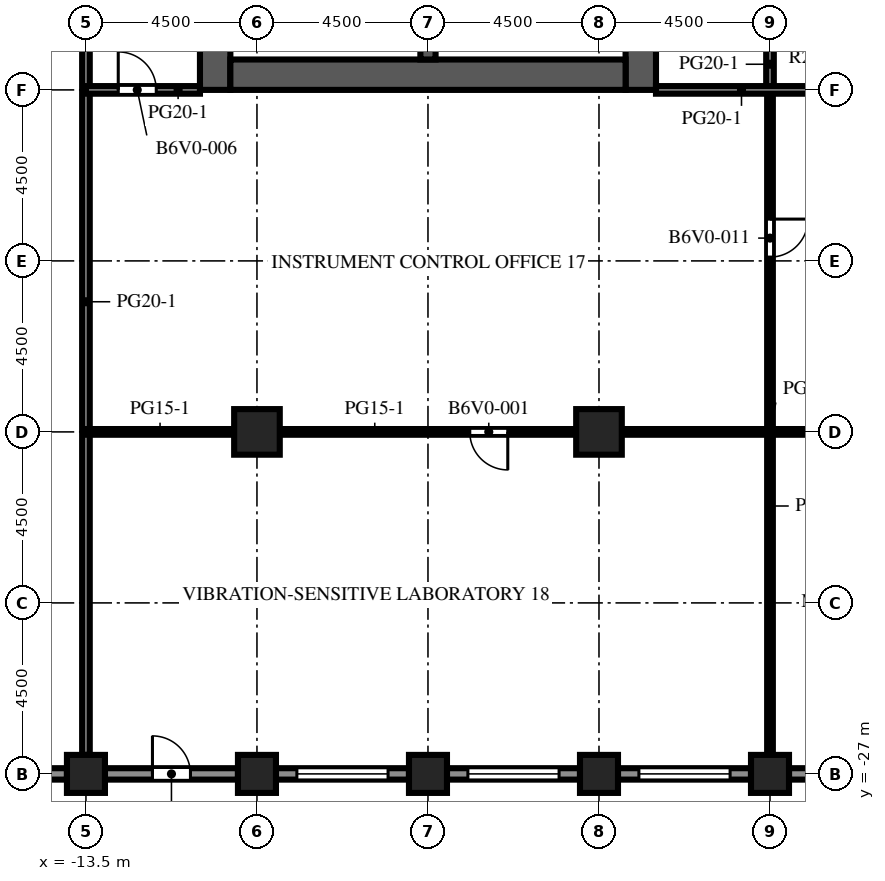
"""IFC4 building model, lengths in metres.
Left out: names, types, materials, properties, quantities, classifications, styles, units other than length and angle.
Written with IfcOpenShell. Run it as: python <this file> out.ifc"""

import sys

from ifc_helpers import new_model, si_unit, direction, frame, frame_2d, origin, origin_2d, place, context, subcontext, project, spatial, rectangle, extrude, element, fill, save


model = new_model("IFC4")
c1 = context("Model", 3, precision=1e-05, world=origin(), true_north=direction((0.0, 1.0)))
c2 = subcontext(c1, "Body", "Model", "MODEL_VIEW")
j1 = project(units=[si_unit("LENGTHUNIT", "METRE"), si_unit("PLANEANGLEUNIT", "RADIAN")], contexts=[c1])
p1 = place(None, origin())
s1 = spatial("IfcSite", under=j1, at=p1, CompositionType="ELEMENT")
p2 = place(p1, origin())
s2 = spatial("IfcBuilding", under=s1, at=p2, CompositionType="ELEMENT")
p3 = place(p2, frame((0.0, 0.0, 195.6)))
s3 = spatial("IfcBuildingStorey", under=s2, at=p3, CompositionType="ELEMENT", Elevation=195.6)
for number, where, z_axis, x_axis in (
    (1, (-13.5, -27.0, 0.0), (0.0, 0.0, 1.0), (1.0, 0.0, 0.0)),
    (2, (-9.0, -27.0, 0.0), (0.0, 0.0, 1.0), (1.0, 0.0, 0.0)),
    (3, (-4.5, -27.0, 0.0), (0.0, 0.0, 1.0), (1.0, 0.0, 0.0)),
    (4, (0.0, -27.0, 0.0), (0.0, 0.0, 1.0), (1.0, 0.0, 0.0)),
    (5, (4.5, -27.0, 0.0), (0.0, 0.0, 1.0), (1.0, 0.0, 0.0)),
):
    element("IfcColumn", number, at=place(p3, frame(where, z_axis=z_axis, x_axis=x_axis)), inside=s3, PredefinedType="COLUMN", context=c2, shape_type="SweptSolid", body=[
        extrude(rectangle(XDim=1.0, YDim=1.0, at=origin_2d()), origin(), (0.0, 0.0, 1.0), 4.1),
    ])
for number, where, z_axis, x_axis in (
    (6, (-9.0, -18.0, 0.0), (0.0, 0.0, 1.0), (1.0, 0.0, 0.0)),
    (7, (0.0, -18.0, 0.0), (0.0, 0.0, 1.0), (1.0, 0.0, 0.0)),
):
    element("IfcColumn", number, at=place(p3, frame(where, z_axis=z_axis, x_axis=x_axis)), inside=s3, PredefinedType="COLUMN", context=c2, shape_type="SweptSolid", body=[
        extrude(rectangle(XDim=1.2, YDim=1.2, at=origin_2d()), origin(), (0.0, 0.0, 1.0), 4.1),
    ])
p4 = place(p3, frame((-10.1, -9.0, 0.0), z_axis=(0.0, 0.0, 1.0), x_axis=(0.0, 1.0, 0.0)))
e8 = element("IfcWall", 8, at=p4, inside=s3, PredefinedType="SHEAR", context=c2, shape_type="SweptSolid", body=[
    extrude(rectangle(XDim=27.5, YDim=0.8, at=frame_2d((13.75, 0.0))), origin(), (0.0, 0.0, 1.0), 4.1),
])
p5 = place(p4, frame((12.55, 0.0, 0.0)))
e9 = element("IfcOpeningElement", 9, at=p5, cuts=e8, PredefinedType="OPENING", context=c2, shape_type="SweptSolid", body=[
    extrude(rectangle(XDim=2.4, YDim=2.4, at=frame_2d((1.2, 1.2))), frame((0.0, 0.41, 0.0), z_axis=(0.0, -1.0, 0.0), x_axis=(1.0, 0.0, 0.0)), (0.0, 0.0, 1.0), 0.82),
])
p6 = place(p4, frame((6.825, 0.0, 0.0)))
e10 = element("IfcOpeningElement", 10, at=p6, cuts=e8, PredefinedType="OPENING", context=c2, shape_type="SweptSolid", body=[
    extrude(rectangle(XDim=1.2, YDim=2.1, at=frame_2d((0.6, 1.05))), frame((0.0, 0.41, 0.0), z_axis=(0.0, -1.0, 0.0), x_axis=(1.0, 0.0, 0.0)), (0.0, 0.0, 1.0), 0.82),
])
p7 = place(p4, frame((19.475, 0.0, 0.0)))
e11 = element("IfcOpeningElement", 11, at=p7, cuts=e8, PredefinedType="OPENING", context=c2, shape_type="SweptSolid", body=[
    extrude(rectangle(XDim=1.2, YDim=2.1, at=frame_2d((0.6, 1.05))), frame((0.0, 0.41, 0.0), z_axis=(0.0, -1.0, 0.0), x_axis=(1.0, 0.0, 0.0)), (0.0, 0.0, 1.0), 0.82),
])
p8 = place(p3, frame((1.1, -9.0, 0.0), z_axis=(0.0, 0.0, 1.0), x_axis=(0.0, 1.0, 0.0)))
e12 = element("IfcWall", 12, at=p8, inside=s3, PredefinedType="SHEAR", context=c2, shape_type="SweptSolid", body=[
    extrude(rectangle(XDim=27.5, YDim=0.8, at=frame_2d((13.75, 0.0))), origin(), (0.0, 0.0, 1.0), 4.1),
])
p9 = place(p8, frame((12.55, 0.0, 0.0)))
e13 = element("IfcOpeningElement", 13, at=p9, cuts=e12, PredefinedType="OPENING", context=c2, shape_type="SweptSolid", body=[
    extrude(rectangle(XDim=2.4, YDim=2.4, at=frame_2d((1.2, 1.2))), frame((0.0, 0.41, 0.0), z_axis=(0.0, -1.0, 0.0), x_axis=(1.0, 0.0, 0.0)), (0.0, 0.0, 1.0), 0.82),
])
p10 = place(p8, frame((3.95, 0.0, 0.0)))
e14 = element("IfcOpeningElement", 14, at=p10, cuts=e12, PredefinedType="OPENING", context=c2, shape_type="SweptSolid", body=[
    extrude(rectangle(XDim=1.2, YDim=2.1, at=frame_2d((0.6, 1.05))), frame((0.0, 0.41, 0.0), z_axis=(0.0, -1.0, 0.0), x_axis=(1.0, 0.0, 0.0)), (0.0, 0.0, 1.0), 0.82),
])
p11 = place(p8, frame((19.45, 0.0, 0.0)))
e15 = element("IfcOpeningElement", 15, at=p11, cuts=e12, PredefinedType="OPENING", context=c2, shape_type="SweptSolid", body=[
    extrude(rectangle(XDim=1.0, YDim=2.1, at=frame_2d((0.5, 1.05))), frame((0.0, 0.41, 0.0), z_axis=(0.0, -1.0, 0.0), x_axis=(1.0, 0.0, 0.0)), (0.0, 0.0, 1.0), 0.82),
])
p12 = place(p8, frame((21.137, 0.0, 0.0)))
e16 = element("IfcOpeningElement", 16, at=p12, cuts=e12, PredefinedType="OPENING", context=c2, shape_type="SweptSolid", body=[
    extrude(rectangle(XDim=1.0, YDim=2.1, at=frame_2d((0.5, 1.05))), frame((0.0, 0.41, 0.0), z_axis=(0.0, -1.0, 0.0), x_axis=(1.0, 0.0, 0.0)), (0.0, 0.0, 1.0), 0.82),
])
p13 = place(p8, frame((23.2, 0.0, 0.0)))
e17 = element("IfcOpeningElement", 17, at=p13, cuts=e12, PredefinedType="OPENING", context=c2, shape_type="SweptSolid", body=[
    extrude(rectangle(XDim=1.0, YDim=2.1, at=frame_2d((0.5, 1.05))), frame((0.0, 0.41, 0.0), z_axis=(0.0, -1.0, 0.0), x_axis=(1.0, 0.0, 0.0)), (0.0, 0.0, 1.0), 0.82),
])
p14 = place(p8, frame((25.262, 0.0, 0.0)))
e18 = element("IfcOpeningElement", 18, at=p14, cuts=e12, PredefinedType="OPENING", context=c2, shape_type="SweptSolid", body=[
    extrude(rectangle(XDim=1.0, YDim=2.1, at=frame_2d((0.5, 1.05))), frame((0.0, 0.41, 0.0), z_axis=(0.0, -1.0, 0.0), x_axis=(1.0, 0.0, 0.0)), (0.0, 0.0, 1.0), 0.82),
])
p15 = place(p3, frame((-9.7, -8.6, 0.0), z_axis=(0.0, 0.0, 1.0), x_axis=(1.0, 0.0, 0.0)))
e19 = element("IfcWall", 19, at=p15, inside=s3, PredefinedType="SHEAR", context=c2, shape_type="SweptSolid", body=[
    extrude(rectangle(XDim=10.4, YDim=0.8, at=frame_2d((5.2, 0.0))), origin(), (0.0, 0.0, 1.0), 4.1),
])
p16 = place(p3, frame((-4.5, -8.2, 0.0), z_axis=(0.0, 0.0, 1.0), x_axis=(0.0, 1.0, 0.0)))
e20 = element("IfcWall", 20, at=p16, inside=s3, PredefinedType="SHEAR", context=c2, shape_type="SweptSolid", body=[
    extrude(rectangle(XDim=7.5, YDim=0.4, at=frame_2d((3.75, 0.0))), origin(), (0.0, 0.0, 1.0), 4.1),
])
p17 = place(p3, frame((-14.0, -27.0, 0.0), z_axis=(0.0, 0.0, 1.0), x_axis=(-1.0, 0.0, 0.0)))
e21 = element("IfcWall", 21, at=p17, inside=s3, PredefinedType="SOLIDWALL", context=c2, shape_type="SweptSolid", body=[
    extrude(rectangle(XDim=3.5, YDim=0.3, at=frame_2d((1.75, 0.0))), origin(), (0.0, 0.0, 1.0), 2.85),
])
p18 = place(p17, frame((0.55, 0.0, 0.8)))
e22 = element("IfcOpeningElement", 22, at=p18, cuts=e21, PredefinedType="OPENING", context=c2, shape_type="SweptSolid", body=[
    extrude(rectangle(XDim=2.4, YDim=1.7, at=frame_2d((1.2, 0.85))), frame((0.0, 0.16, 0.0), z_axis=(0.0, -1.0, 0.0), x_axis=(1.0, 0.0, 0.0)), (0.0, 0.0, 1.0), 0.32),
])
p19 = place(p3, frame((-9.5, -27.0, 0.0), z_axis=(0.0, 0.0, 1.0), x_axis=(-1.0, 0.0, 0.0)))
e23 = element("IfcWall", 23, at=p19, inside=s3, PredefinedType="SOLIDWALL", context=c2, shape_type="SweptSolid", body=[
    extrude(rectangle(XDim=3.5, YDim=0.3, at=frame_2d((1.75, 0.0))), origin(), (0.0, 0.0, 1.0), 2.85),
])
p20 = place(p19, frame((1.25, 0.0, 0.0)))
e24 = element("IfcOpeningElement", 24, at=p20, cuts=e23, PredefinedType="OPENING", context=c2, shape_type="SweptSolid", body=[
    extrude(rectangle(XDim=1.0, YDim=2.2, at=frame_2d((0.5, 1.1))), frame((0.0, 0.16, 0.0), z_axis=(0.0, -1.0, 0.0), x_axis=(1.0, 0.0, 0.0)), (0.0, 0.0, 1.0), 0.32),
])
p21 = place(p3, frame((-5.0, -27.0, 0.0), z_axis=(0.0, 0.0, 1.0), x_axis=(-1.0, 0.0, 0.0)))
e25 = element("IfcWall", 25, at=p21, inside=s3, PredefinedType="SOLIDWALL", context=c2, shape_type="SweptSolid", body=[
    extrude(rectangle(XDim=3.5, YDim=0.3, at=frame_2d((1.75, 0.0))), origin(), (0.0, 0.0, 1.0), 2.85),
])
p22 = place(p21, frame((0.55, 0.0, 0.8)))
e26 = element("IfcOpeningElement", 26, at=p22, cuts=e25, PredefinedType="OPENING", context=c2, shape_type="SweptSolid", body=[
    extrude(rectangle(XDim=2.4, YDim=1.7, at=frame_2d((1.2, 0.85))), frame((0.0, 0.16, 0.0), z_axis=(0.0, -1.0, 0.0), x_axis=(1.0, 0.0, 0.0)), (0.0, 0.0, 1.0), 0.32),
])
p23 = place(p3, frame((-0.5, -27.0, 0.0), z_axis=(0.0, 0.0, 1.0), x_axis=(-1.0, 0.0, 0.0)))
e27 = element("IfcWall", 27, at=p23, inside=s3, PredefinedType="SOLIDWALL", context=c2, shape_type="SweptSolid", body=[
    extrude(rectangle(XDim=3.5, YDim=0.3, at=frame_2d((1.75, 0.0))), origin(), (0.0, 0.0, 1.0), 2.85),
])
p24 = place(p23, frame((0.55, 0.0, 0.8)))
e28 = element("IfcOpeningElement", 28, at=p24, cuts=e27, PredefinedType="OPENING", context=c2, shape_type="SweptSolid", body=[
    extrude(rectangle(XDim=2.4, YDim=1.7, at=frame_2d((1.2, 0.85))), frame((0.0, 0.16, 0.0), z_axis=(0.0, -1.0, 0.0), x_axis=(1.0, 0.0, 0.0)), (0.0, 0.0, 1.0), 0.32),
])
p25 = place(p3, frame((4.0, -27.0, 0.0), z_axis=(0.0, 0.0, 1.0), x_axis=(-1.0, 0.0, 0.0)))
e29 = element("IfcWall", 29, at=p25, inside=s3, PredefinedType="SOLIDWALL", context=c2, shape_type="SweptSolid", body=[
    extrude(rectangle(XDim=3.5, YDim=0.3, at=frame_2d((1.75, 0.0))), origin(), (0.0, 0.0, 1.0), 2.85),
])
p26 = place(p25, frame((0.55, 0.0, 0.8)))
e30 = element("IfcOpeningElement", 30, at=p26, cuts=e29, PredefinedType="OPENING", context=c2, shape_type="SweptSolid", body=[
    extrude(rectangle(XDim=2.4, YDim=1.7, at=frame_2d((1.2, 0.85))), frame((0.0, 0.16, 0.0), z_axis=(0.0, -1.0, 0.0), x_axis=(1.0, 0.0, 0.0)), (0.0, 0.0, 1.0), 0.32),
])
p27 = place(p3, frame((8.5, -27.0, 0.0), z_axis=(0.0, 0.0, 1.0), x_axis=(-1.0, 0.0, 0.0)))
e31 = element("IfcWall", 31, at=p27, inside=s3, PredefinedType="SOLIDWALL", context=c2, shape_type="SweptSolid", body=[
    extrude(rectangle(XDim=3.5, YDim=0.3, at=frame_2d((1.75, 0.0))), origin(), (0.0, 0.0, 1.0), 2.85),
])
p28 = place(p27, frame((0.55, 0.0, 0.8)))
e32 = element("IfcOpeningElement", 32, at=p28, cuts=e31, PredefinedType="OPENING", context=c2, shape_type="SweptSolid", body=[
    extrude(rectangle(XDim=2.4, YDim=1.7, at=frame_2d((1.2, 0.85))), frame((0.0, 0.16, 0.0), z_axis=(0.0, -1.0, 0.0), x_axis=(1.0, 0.0, 0.0)), (0.0, 0.0, 1.0), 0.32),
])
p29 = place(p3, frame((-13.5, -26.5, 0.0), z_axis=(0.0, 0.0, 1.0), x_axis=(0.0, 1.0, 0.0)))
e33 = element("IfcWall", 33, at=p29, inside=s3, PredefinedType="PARTITIONING", context=c2, shape_type="SweptSolid", body=[
    extrude(rectangle(XDim=29.75, YDim=0.2, at=frame_2d((14.875, 0.0))), origin(), (0.0, 0.0, 1.0), 3.65),
])
p30 = place(p29, frame((23.85, 0.0, 0.0)))
e34 = element("IfcOpeningElement", 34, at=p30, cuts=e33, PredefinedType="OPENING", context=c2, shape_type="SweptSolid", body=[
    extrude(rectangle(XDim=1.0, YDim=2.1, at=frame_2d((0.5, 1.05))), frame((0.0, 0.11, 0.0), z_axis=(0.0, -1.0, 0.0), x_axis=(1.0, 0.0, 0.0)), (0.0, 0.0, 1.0), 0.22),
])
p31 = place(p3, frame((4.5, -9.0, 0.0), z_axis=(0.0, 0.0, 1.0), x_axis=(0.0, -1.0, 0.0)))
e35 = element("IfcWall", 35, at=p31, inside=s3, PredefinedType="PARTITIONING", context=c2, shape_type="SweptSolid", body=[
    extrude(rectangle(XDim=17.5, YDim=0.15, at=frame_2d((8.75, 0.0))), origin(), (0.0, 0.0, 1.0), 3.65),
])
p32 = place(p31, frame((3.4, 0.0, 0.0)))
e36 = element("IfcOpeningElement", 36, at=p32, cuts=e35, PredefinedType="OPENING", context=c2, shape_type="SweptSolid", body=[
    extrude(rectangle(XDim=1.0, YDim=2.1, at=frame_2d((0.5, 1.05))), frame((0.0, 0.085, 0.0), z_axis=(0.0, -1.0, 0.0), x_axis=(1.0, 0.0, 0.0)), (0.0, 0.0, 1.0), 0.17),
])
p33 = place(p3, frame((4.5, -6.0, 0.0), z_axis=(0.0, 0.0, 1.0), x_axis=(0.0, -1.0, 0.0)))
e37 = element("IfcWall", 37, at=p33, inside=s3, PredefinedType="PARTITIONING", context=c2, shape_type="SweptSolid", body=[
    extrude(rectangle(XDim=3.0, YDim=0.2, at=frame_2d((1.5, 0.0))), origin(), (0.0, 0.0, 1.0), 3.65),
])
p34 = place(p33, frame((0.65, 0.0, 0.0)))
e38 = element("IfcOpeningElement", 38, at=p34, cuts=e37, PredefinedType="OPENING", context=c2, shape_type="SweptSolid", body=[
    extrude(rectangle(XDim=1.0, YDim=2.1, at=frame_2d((0.5, 1.05))), frame((0.0, 0.11, 0.0), z_axis=(0.0, -1.0, 0.0), x_axis=(1.0, 0.0, 0.0)), (0.0, 0.0, 1.0), 0.22),
])
p35 = place(p3, frame((-13.5, -18.0, 0.0), z_axis=(0.0, 0.0, 1.0), x_axis=(1.0, 0.0, 0.0)))
e39 = element("IfcWall", 39, at=p35, inside=s3, PredefinedType="PARTITIONING", context=c2, shape_type="SweptSolid", body=[
    extrude(rectangle(XDim=3.9, YDim=0.15, at=frame_2d((1.95, 0.0))), origin(), (0.0, 0.0, 1.0), 3.65),
])
p36 = place(p3, frame((-0.6, -18.0, 0.0), z_axis=(0.0, 0.0, 1.0), x_axis=(-1.0, 0.0, 0.0)))
e40 = element("IfcWall", 40, at=p36, inside=s3, PredefinedType="PARTITIONING", context=c2, shape_type="SweptSolid", body=[
    extrude(rectangle(XDim=7.8, YDim=0.15, at=frame_2d((3.9, 0.0))), origin(), (0.0, 0.0, 1.0), 3.65),
])
p37 = place(p36, frame((1.8, 0.0, 0.0)))
e41 = element("IfcOpeningElement", 41, at=p37, cuts=e40, PredefinedType="OPENING", context=c2, shape_type="SweptSolid", body=[
    extrude(rectangle(XDim=1.0, YDim=2.1, at=frame_2d((0.5, 1.05))), frame((0.0, 0.085, 0.0), z_axis=(0.0, -1.0, 0.0), x_axis=(1.0, 0.0, 0.0)), (0.0, 0.0, 1.0), 0.17),
])
p38 = place(p3, frame((0.6, -18.0, 0.0), z_axis=(0.0, 0.0, 1.0), x_axis=(1.0, 0.0, 0.0)))
e42 = element("IfcWall", 42, at=p38, inside=s3, PredefinedType="PARTITIONING", context=c2, shape_type="SweptSolid", body=[
    extrude(rectangle(XDim=7.8, YDim=0.15, at=frame_2d((3.9, 0.0))), origin(), (0.0, 0.0, 1.0), 3.65),
])
p39 = place(p3, frame((-10.5, -9.0, 0.0), z_axis=(0.0, 0.0, 1.0), x_axis=(-1.0, 0.0, 0.0)))
e43 = element("IfcWall", 43, at=p39, inside=s3, PredefinedType="PARTITIONING", context=c2, shape_type="SweptSolid", body=[
    extrude(rectangle(XDim=3.0, YDim=0.2, at=frame_2d((1.5, 0.0))), origin(), (0.0, 0.0, 1.0), 3.65),
])
p40 = place(p39, frame((1.15, 0.0, 0.0)))
e44 = element("IfcOpeningElement", 44, at=p40, cuts=e43, PredefinedType="OPENING", context=c2, shape_type="SweptSolid", body=[
    extrude(rectangle(XDim=1.0, YDim=2.1, at=frame_2d((0.5, 1.05))), frame((0.0, 0.11, 0.0), z_axis=(0.0, -1.0, 0.0), x_axis=(1.0, 0.0, 0.0)), (0.0, 0.0, 1.0), 0.22),
])
p41 = place(p3, frame((1.5, -9.0, 0.0), z_axis=(0.0, 0.0, 1.0), x_axis=(1.0, 0.0, 0.0)))
e45 = element("IfcWall", 45, at=p41, inside=s3, PredefinedType="PARTITIONING", context=c2, shape_type="SweptSolid", body=[
    extrude(rectangle(XDim=4.5, YDim=0.2, at=frame_2d((2.25, 0.0))), origin(), (0.0, 0.0, 1.0), 3.65),
])
p42 = place(p20, origin())
e46 = element("IfcDoor", 46, at=p42, inside=s3, OperationType="SINGLE_SWING_RIGHT", PredefinedType="DOOR", context=c2, shape_type="SweptSolid", body=[
    extrude(rectangle(XDim=1.0, YDim=2.2, at=frame_2d((0.5, 1.1))), frame((0.0, 0.025, 0.0), z_axis=(0.0, -1.0, 0.0), x_axis=(1.0, 0.0, 0.0)), (0.0, 0.0, 1.0), 0.05),
])
fill(e24, e46)
p43 = place(p22, origin())
e47 = element("IfcWindow", 47, at=p43, inside=s3, PartitioningType="SINGLE_PANEL", PredefinedType="WINDOW", context=c2, shape_type="SweptSolid", body=[
    extrude(rectangle(XDim=2.4, YDim=1.7, at=frame_2d((1.2, 0.85))), frame((0.0, 0.03, 0.0), z_axis=(0.0, -1.0, 0.0), x_axis=(1.0, 0.0, 0.0)), (0.0, 0.0, 1.0), 0.06),
])
fill(e26, e47)
p44 = place(p24, origin())
e48 = element("IfcWindow", 48, at=p44, inside=s3, PartitioningType="SINGLE_PANEL", PredefinedType="WINDOW", context=c2, shape_type="SweptSolid", body=[
    extrude(rectangle(XDim=2.4, YDim=1.7, at=frame_2d((1.2, 0.85))), frame((0.0, 0.03, 0.0), z_axis=(0.0, -1.0, 0.0), x_axis=(1.0, 0.0, 0.0)), (0.0, 0.0, 1.0), 0.06),
])
fill(e28, e48)
p45 = place(p26, origin())
e49 = element("IfcWindow", 49, at=p45, inside=s3, PartitioningType="SINGLE_PANEL", PredefinedType="WINDOW", context=c2, shape_type="SweptSolid", body=[
    extrude(rectangle(XDim=2.4, YDim=1.7, at=frame_2d((1.2, 0.85))), frame((0.0, 0.03, 0.0), z_axis=(0.0, -1.0, 0.0), x_axis=(1.0, 0.0, 0.0)), (0.0, 0.0, 1.0), 0.06),
])
fill(e30, e49)
p46 = place(p37, origin())
e50 = element("IfcDoor", 50, at=p46, inside=s3, OperationType="SINGLE_SWING_LEFT", PredefinedType="DOOR", context=c2, shape_type="SweptSolid", body=[
    extrude(rectangle(XDim=1.0, YDim=2.1, at=frame_2d((0.5, 1.05))), frame((0.0, 0.025, 0.0), z_axis=(0.0, -1.0, 0.0), x_axis=(1.0, 0.0, 0.0)), (0.0, 0.0, 1.0), 0.05),
])
fill(e41, e50)
p47 = place(p40, origin())
e51 = element("IfcDoor", 51, at=p47, inside=s3, OperationType="SINGLE_SWING_RIGHT", PredefinedType="DOOR", context=c2, shape_type="SweptSolid", body=[
    extrude(rectangle(XDim=1.0, YDim=2.1, at=frame_2d((0.5, 1.05))), frame((0.0, 0.025, 0.0), z_axis=(0.0, -1.0, 0.0), x_axis=(1.0, 0.0, 0.0)), (0.0, 0.0, 1.0), 0.05),
])
fill(e44, e51)
p48 = place(p32, origin())
e52 = element("IfcDoor", 52, at=p48, inside=s3, OperationType="SINGLE_SWING_LEFT", PredefinedType="DOOR", context=c2, shape_type="SweptSolid", body=[
    extrude(rectangle(XDim=1.0, YDim=2.1, at=frame_2d((0.5, 1.05))), frame((0.0, 0.025, 0.0), z_axis=(0.0, -1.0, 0.0), x_axis=(1.0, 0.0, 0.0)), (0.0, 0.0, 1.0), 0.05),
])
fill(e36, e52)
save(model, sys.argv[1])
